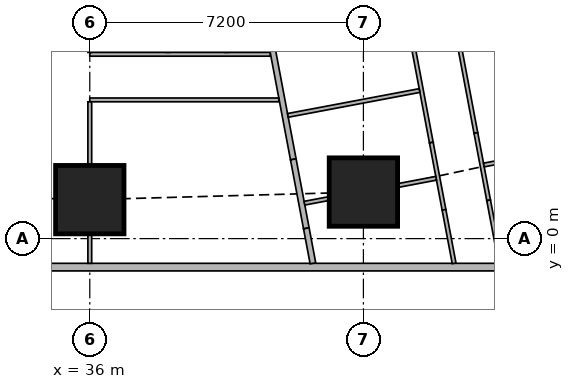
"""IFC4 building model, lengths in metres.
Left out: names, types, materials, properties, quantities, classifications, styles, units other than length and angle.
Written with IfcOpenShell. Run it as: python <this file> out.ifc"""

import sys

from ifc_helpers import new_model, si_unit, direction, frame, frame_2d, origin, origin_2d, place, context, subcontext, project, spatial, rectangle, extrude, element, fill, save


model = new_model("IFC4")
c1 = context("Model", 3, precision=1e-05, world=origin(), true_north=direction((0.0, 1.0)))
c2 = subcontext(c1, "Body", "Model", "MODEL_VIEW")
j1 = project(units=[si_unit("LENGTHUNIT", "METRE"), si_unit("PLANEANGLEUNIT", "RADIAN")], contexts=[c1])
p1 = place(None, origin())
s1 = spatial("IfcSite", under=j1, at=p1, CompositionType="ELEMENT")
p2 = place(p1, origin())
s2 = spatial("IfcBuilding", under=s1, at=p2, CompositionType="ELEMENT")
p3 = place(p2, frame((0.0, 0.0, 158.3)))
s3 = spatial("IfcBuildingStorey", under=s2, at=p3, CompositionType="ELEMENT", Elevation=158.3)
for number, where, z_axis, x_axis in (
    (1, (36.0, 1.025, 0.0), (0.0, 0.0, 1.0), (1.0, 0.0, 0.0)),
    (2, (43.2, 1.225, 0.0), (0.0, 0.0, 1.0), (1.0, 0.0, 0.0)),
):
    element("IfcColumn", number, at=place(p3, frame(where, z_axis=z_axis, x_axis=x_axis)), inside=s3, PredefinedType="COLUMN", context=c2, shape_type="SweptSolid", body=[
        extrude(rectangle(XDim=1.8, YDim=1.8, at=origin_2d()), origin(), (0.0, 0.0, 1.0), 3.75),
    ])
p4 = place(p3, frame((2.163, -0.75, 0.0), z_axis=(0.0, 0.0, 1.0), x_axis=(1.0, 0.0, 0.0)))
e3 = element("IfcWall", 3, at=p4, inside=s3, PredefinedType="SOLIDWALL", context=c2, shape_type="SweptSolid", body=[
    extrude(rectangle(XDim=45.628, YDim=0.2, at=frame_2d((22.814, 0.0))), origin(), (0.0, 0.0, 1.0), 3.5),
])
p5 = place(p4, frame((9.537, 0.0, 0.9)))
e4 = element("IfcOpeningElement", 4, at=p5, cuts=e3, PredefinedType="OPENING", context=c2, shape_type="SweptSolid", body=[
    extrude(rectangle(XDim=1.8, YDim=1.5, at=frame_2d((0.9, 0.75))), frame((0.0, 0.11, 0.0), z_axis=(0.0, -1.0, 0.0), x_axis=(1.0, 0.0, 0.0)), (0.0, 0.0, 1.0), 0.22),
])
p6 = place(p4, frame((13.137, 0.0, 0.9)))
e5 = element("IfcOpeningElement", 5, at=p6, cuts=e3, PredefinedType="OPENING", context=c2, shape_type="SweptSolid", body=[
    extrude(rectangle(XDim=1.8, YDim=1.5, at=frame_2d((0.9, 0.75))), frame((0.0, 0.11, 0.0), z_axis=(0.0, -1.0, 0.0), x_axis=(1.0, 0.0, 0.0)), (0.0, 0.0, 1.0), 0.22),
])
p7 = place(p4, frame((16.737, 0.0, 0.9)))
e6 = element("IfcOpeningElement", 6, at=p7, cuts=e3, PredefinedType="OPENING", context=c2, shape_type="SweptSolid", body=[
    extrude(rectangle(XDim=1.8, YDim=1.5, at=frame_2d((0.9, 0.75))), frame((0.0, 0.11, 0.0), z_axis=(0.0, -1.0, 0.0), x_axis=(1.0, 0.0, 0.0)), (0.0, 0.0, 1.0), 0.22),
])
p8 = place(p4, frame((20.337, 0.0, 0.9)))
e7 = element("IfcOpeningElement", 7, at=p8, cuts=e3, PredefinedType="OPENING", context=c2, shape_type="SweptSolid", body=[
    extrude(rectangle(XDim=1.8, YDim=1.5, at=frame_2d((0.9, 0.75))), frame((0.0, 0.11, 0.0), z_axis=(0.0, -1.0, 0.0), x_axis=(1.0, 0.0, 0.0)), (0.0, 0.0, 1.0), 0.22),
])
p9 = place(p4, frame((23.937, 0.0, 0.9)))
e8 = element("IfcOpeningElement", 8, at=p9, cuts=e3, PredefinedType="OPENING", context=c2, shape_type="SweptSolid", body=[
    extrude(rectangle(XDim=1.8, YDim=1.5, at=frame_2d((0.9, 0.75))), frame((0.0, 0.11, 0.0), z_axis=(0.0, -1.0, 0.0), x_axis=(1.0, 0.0, 0.0)), (0.0, 0.0, 1.0), 0.22),
])
p10 = place(p4, frame((27.537, 0.0, 0.9)))
e9 = element("IfcOpeningElement", 9, at=p10, cuts=e3, PredefinedType="OPENING", context=c2, shape_type="SweptSolid", body=[
    extrude(rectangle(XDim=1.8, YDim=1.5, at=frame_2d((0.9, 0.75))), frame((0.0, 0.11, 0.0), z_axis=(0.0, -1.0, 0.0), x_axis=(1.0, 0.0, 0.0)), (0.0, 0.0, 1.0), 0.22),
])
p11 = place(p4, frame((31.137, 0.0, 0.9)))
e10 = element("IfcOpeningElement", 10, at=p11, cuts=e3, PredefinedType="OPENING", context=c2, shape_type="SweptSolid", body=[
    extrude(rectangle(XDim=1.8, YDim=1.5, at=frame_2d((0.9, 0.75))), frame((0.0, 0.11, 0.0), z_axis=(0.0, -1.0, 0.0), x_axis=(1.0, 0.0, 0.0)), (0.0, 0.0, 1.0), 0.22),
])
p12 = place(p4, frame((34.737, 0.0, 0.9)))
e11 = element("IfcOpeningElement", 11, at=p12, cuts=e3, PredefinedType="OPENING", context=c2, shape_type="SweptSolid", body=[
    extrude(rectangle(XDim=1.8, YDim=1.5, at=frame_2d((0.9, 0.75))), frame((0.0, 0.11, 0.0), z_axis=(0.0, -1.0, 0.0), x_axis=(1.0, 0.0, 0.0)), (0.0, 0.0, 1.0), 0.22),
])
p13 = place(p3, frame((50.653, 2.703, 0.0), z_axis=(0.0, 0.0, 1.0), x_axis=(-0.185612026696, 0.982623109613, 0.0)))
e12 = element("IfcWall", 12, at=p13, inside=s3, PredefinedType="SOLIDWALL", context=c2, shape_type="SweptSolid", body=[
    extrude(rectangle(XDim=41.393, YDim=0.2, at=frame_2d((20.697, 0.0))), origin(), (0.0, 0.0, 1.0), 3.5),
])
p14 = place(p13, frame((1.633, 0.0, 0.9)))
e13 = element("IfcOpeningElement", 13, at=p14, cuts=e12, PredefinedType="OPENING", context=c2, shape_type="SweptSolid", body=[
    extrude(rectangle(XDim=1.8, YDim=1.5, at=frame_2d((0.9, 0.75))), frame((0.0, 0.11, 0.0), z_axis=(0.0, -1.0, 0.0), x_axis=(1.0, 0.0, 0.0)), (0.0, 0.0, 1.0), 0.22),
])
p15 = place(p13, frame((6.032, 0.0, 0.9)))
e14 = element("IfcOpeningElement", 14, at=p15, cuts=e12, PredefinedType="OPENING", context=c2, shape_type="SweptSolid", body=[
    extrude(rectangle(XDim=1.8, YDim=1.5, at=frame_2d((0.9, 0.75))), frame((0.0, 0.11, 0.0), z_axis=(0.0, -1.0, 0.0), x_axis=(1.0, 0.0, 0.0)), (0.0, 0.0, 1.0), 0.22),
])
p16 = place(p13, frame((9.848, 0.0, 0.9)))
e15 = element("IfcOpeningElement", 15, at=p16, cuts=e12, PredefinedType="OPENING", context=c2, shape_type="SweptSolid", body=[
    extrude(rectangle(XDim=1.8, YDim=1.5, at=frame_2d((0.9, 0.75))), frame((0.0, 0.11, 0.0), z_axis=(0.0, -1.0, 0.0), x_axis=(1.0, 0.0, 0.0)), (0.0, 0.0, 1.0), 0.22),
])
p17 = place(p13, frame((13.664, 0.0, 0.9)))
e16 = element("IfcOpeningElement", 16, at=p17, cuts=e12, PredefinedType="OPENING", context=c2, shape_type="SweptSolid", body=[
    extrude(rectangle(XDim=1.8, YDim=1.5, at=frame_2d((0.9, 0.75))), frame((0.0, 0.11, 0.0), z_axis=(0.0, -1.0, 0.0), x_axis=(1.0, 0.0, 0.0)), (0.0, 0.0, 1.0), 0.22),
])
p18 = place(p13, frame((17.481, 0.0, 0.9)))
e17 = element("IfcOpeningElement", 17, at=p18, cuts=e12, PredefinedType="OPENING", context=c2, shape_type="SweptSolid", body=[
    extrude(rectangle(XDim=1.8, YDim=1.5, at=frame_2d((0.9, 0.75))), frame((0.0, 0.11, 0.0), z_axis=(0.0, -1.0, 0.0), x_axis=(1.0, 0.0, 0.0)), (0.0, 0.0, 1.0), 0.22),
])
p19 = place(p13, frame((21.297, 0.0, 0.9)))
e18 = element("IfcOpeningElement", 18, at=p19, cuts=e12, PredefinedType="OPENING", context=c2, shape_type="SweptSolid", body=[
    extrude(rectangle(XDim=1.8, YDim=1.5, at=frame_2d((0.9, 0.75))), frame((0.0, 0.11, 0.0), z_axis=(0.0, -1.0, 0.0), x_axis=(1.0, 0.0, 0.0)), (0.0, 0.0, 1.0), 0.22),
])
p20 = place(p13, frame((25.113, 0.0, 0.9)))
e19 = element("IfcOpeningElement", 19, at=p20, cuts=e12, PredefinedType="OPENING", context=c2, shape_type="SweptSolid", body=[
    extrude(rectangle(XDim=1.8, YDim=1.5, at=frame_2d((0.9, 0.75))), frame((0.0, 0.11, 0.0), z_axis=(0.0, -1.0, 0.0), x_axis=(1.0, 0.0, 0.0)), (0.0, 0.0, 1.0), 0.22),
])
p21 = place(p13, frame((28.93, 0.0, 0.9)))
e20 = element("IfcOpeningElement", 20, at=p21, cuts=e12, PredefinedType="OPENING", context=c2, shape_type="SweptSolid", body=[
    extrude(rectangle(XDim=1.8, YDim=1.5, at=frame_2d((0.9, 0.75))), frame((0.0, 0.11, 0.0), z_axis=(0.0, -1.0, 0.0), x_axis=(1.0, 0.0, 0.0)), (0.0, 0.0, 1.0), 0.22),
])
p22 = place(p13, frame((32.746, 0.0, 0.9)))
e21 = element("IfcOpeningElement", 21, at=p22, cuts=e12, PredefinedType="OPENING", context=c2, shape_type="SweptSolid", body=[
    extrude(rectangle(XDim=1.8, YDim=1.5, at=frame_2d((0.9, 0.75))), frame((0.0, 0.11, 0.0), z_axis=(0.0, -1.0, 0.0), x_axis=(1.0, 0.0, 0.0)), (0.0, 0.0, 1.0), 0.22),
])
p23 = place(p13, frame((36.481, 0.0, 0.9)))
e22 = element("IfcOpeningElement", 22, at=p23, cuts=e12, PredefinedType="OPENING", context=c2, shape_type="SweptSolid", body=[
    extrude(rectangle(XDim=1.8, YDim=1.5, at=frame_2d((0.9, 0.75))), frame((0.0, 0.11, 0.0), z_axis=(0.0, -1.0, 0.0), x_axis=(1.0, 0.0, 0.0)), (0.0, 0.0, 1.0), 0.22),
])
p24 = place(p3, frame((33.623, 43.022, 0.0), z_axis=(0.0, 0.0, 1.0), x_axis=(0.185596841028, -0.98262597798, 0.0)))
e23 = element("IfcWall", 23, at=p24, inside=s3, PredefinedType="SOLIDWALL", context=c2, shape_type="SweptSolid", body=[
    extrude(rectangle(XDim=41.66, YDim=0.15, at=frame_2d((20.83, 0.0))), origin(), (0.0, 0.0, 1.0), 2.5),
])
p25 = place(p24, frame((21.514, 0.0, 0.0)))
e24 = element("IfcOpeningElement", 24, at=p25, cuts=e23, PredefinedType="OPENING", context=c2, shape_type="SweptSolid", body=[
    extrude(rectangle(XDim=1.0, YDim=2.1, at=frame_2d((0.5, 1.05))), frame((0.0, 0.085, 0.0), z_axis=(0.0, -1.0, 0.0), x_axis=(1.0, 0.0, 0.0)), (0.0, 0.0, 1.0), 0.17),
])
p26 = place(p24, frame((27.062, 0.0, 0.0)))
e25 = element("IfcOpeningElement", 25, at=p26, cuts=e23, PredefinedType="OPENING", context=c2, shape_type="SweptSolid", body=[
    extrude(rectangle(XDim=1.0, YDim=2.1, at=frame_2d((0.5, 1.05))), frame((0.0, 0.085, 0.0), z_axis=(0.0, -1.0, 0.0), x_axis=(1.0, 0.0, 0.0)), (0.0, 0.0, 1.0), 0.17),
])
p27 = place(p24, frame((29.934, 0.0, 0.0)))
e26 = element("IfcOpeningElement", 26, at=p27, cuts=e23, PredefinedType="OPENING", context=c2, shape_type="SweptSolid", body=[
    extrude(rectangle(XDim=1.0, YDim=2.1, at=frame_2d((0.5, 1.05))), frame((0.0, 0.085, 0.0), z_axis=(0.0, -1.0, 0.0), x_axis=(1.0, 0.0, 0.0)), (0.0, 0.0, 1.0), 0.17),
])
p28 = place(p3, frame((41.355, 2.086, 0.0), z_axis=(0.0, 0.0, 1.0), x_axis=(0.185708872674, -0.982604811005, 0.0)))
e27 = element("IfcWall", 27, at=p28, inside=s3, PredefinedType="SOLIDWALL", context=c2, shape_type="SweptSolid", body=[
    extrude(rectangle(XDim=1.847, YDim=0.15, at=frame_2d((0.924, 0.0))), origin(), (0.0, 0.0, 1.0), 2.1),
])
p29 = place(p3, frame((41.698, 0.271, 0.0), z_axis=(0.0, 0.0, 1.0), x_axis=(0.185735329995, -0.982599810295, 0.0)))
e28 = element("IfcWall", 28, at=p29, inside=s3, PredefinedType="SOLIDWALL", context=c2, shape_type="SweptSolid", body=[
    extrude(rectangle(XDim=0.937, YDim=0.15, at=frame_2d((0.469, 0.0))), origin(), (0.0, 0.0, 1.0), 3.5),
])
p30 = place(p3, frame((40.974, 3.65, 0.0), z_axis=(0.0, 0.0, 1.0), x_axis=(-1.0, 0.0, 0.0)))
e29 = element("IfcWall", 29, at=p30, inside=s3, PredefinedType="PARTITIONING", context=c2, shape_type="SweptSolid", body=[
    extrude(rectangle(XDim=4.974, YDim=0.1, at=frame_2d((2.487, 0.0))), origin(), (0.0, 0.0, 1.0), 3.5),
])
p31 = place(p30, frame((3.874, 0.0, 0.0)))
e30 = element("IfcOpeningElement", 30, at=p31, cuts=e29, PredefinedType="OPENING", context=c2, shape_type="SweptSolid", body=[
    extrude(rectangle(XDim=0.9, YDim=2.1, at=frame_2d((0.45, 1.05))), frame((0.0, 0.06, 0.0), z_axis=(0.0, -1.0, 0.0), x_axis=(1.0, 0.0, 0.0)), (0.0, 0.0, 1.0), 0.12),
])
p32 = place(p3, frame((40.747, 4.85, 0.0), z_axis=(0.0, 0.0, 1.0), x_axis=(-1.0, 0.0, 0.0)))
e31 = element("IfcWall", 31, at=p32, inside=s3, PredefinedType="PARTITIONING", context=c2, shape_type="SweptSolid", body=[
    extrude(rectangle(XDim=4.747, YDim=0.1, at=frame_2d((2.374, 0.0))), origin(), (0.0, 0.0, 1.0), 3.5),
])
p33 = place(p32, frame((3.272, 0.0, 0.0)))
e32 = element("IfcOpeningElement", 32, at=p33, cuts=e31, PredefinedType="OPENING", context=c2, shape_type="SweptSolid", body=[
    extrude(rectangle(XDim=0.9, YDim=2.1, at=frame_2d((0.45, 1.05))), frame((0.0, 0.06, 0.0), z_axis=(0.0, -1.0, 0.0), x_axis=(1.0, 0.0, 0.0)), (0.0, 0.0, 1.0), 0.12),
])
p34 = place(p32, frame((0.15, 0.0, 0.0)))
e33 = element("IfcOpeningElement", 33, at=p34, cuts=e31, PredefinedType="OPENING", context=c2, shape_type="SweptSolid", body=[
    extrude(rectangle(XDim=0.9, YDim=2.1, at=frame_2d((0.45, 1.05))), frame((0.0, 0.06, 0.0), z_axis=(0.0, -1.0, 0.0), x_axis=(1.0, 0.0, 0.0)), (0.0, 0.0, 1.0), 0.12),
])
p35 = place(p32, frame((1.472, 0.0, 0.0)))
e34 = element("IfcOpeningElement", 34, at=p35, cuts=e31, PredefinedType="OPENING", context=c2, shape_type="SweptSolid", body=[
    extrude(rectangle(XDim=0.9, YDim=2.1, at=frame_2d((0.45, 1.05))), frame((0.0, 0.06, 0.0), z_axis=(0.0, -1.0, 0.0), x_axis=(1.0, 0.0, 0.0)), (0.0, 0.0, 1.0), 0.12),
])
p36 = place(p3, frame((36.0, -0.65, 0.0), z_axis=(0.0, 0.0, 1.0), x_axis=(0.0, 1.0, 0.0)))
e35 = element("IfcWall", 35, at=p36, inside=s3, PredefinedType="PARTITIONING", context=c2, shape_type="SweptSolid", body=[
    extrude(rectangle(XDim=0.774, YDim=0.1, at=frame_2d((0.387, 0.0))), origin(), (0.0, 0.0, 1.0), 3.5),
])
p37 = place(p3, frame((36.0, 1.926, 0.0), z_axis=(0.0, 0.0, 1.0), x_axis=(0.0, 1.0, 0.0)))
e36 = element("IfcWall", 36, at=p37, inside=s3, PredefinedType="PARTITIONING", context=c2, shape_type="SweptSolid", body=[
    extrude(rectangle(XDim=1.674, YDim=0.1, at=frame_2d((0.837, 0.0))), origin(), (0.0, 0.0, 1.0), 3.5),
])
p38 = place(p3, frame((36.0, 4.9, 0.0), z_axis=(0.0, 0.0, 1.0), x_axis=(0.0, 1.0, 0.0)))
e37 = element("IfcWall", 37, at=p38, inside=s3, PredefinedType="PARTITIONING", context=c2, shape_type="SweptSolid", body=[
    extrude(rectangle(XDim=1.849, YDim=0.1, at=frame_2d((0.925, 0.0))), origin(), (0.0, 0.0, 1.0), 3.5),
])
for number, where, z_axis, x_axis in (
    (38, (39.6, 4.9, 0.0), (0.0, 0.0, 1.0), (0.0, 1.0, 0.0)),
    (39, (38.05, 4.9, 0.0), (0.0, 0.0, 1.0), (0.0, 1.0, 0.0)),
):
    element("IfcWall", number, at=place(p3, frame(where, z_axis=z_axis, x_axis=x_axis)), inside=s3, PredefinedType="PARTITIONING", context=c2, shape_type="SweptSolid", body=[
        extrude(rectangle(XDim=3.525, YDim=0.1, at=frame_2d((1.763, 0.0))), origin(), (0.0, 0.0, 1.0), 3.5),
    ])
p39 = place(p3, frame((43.992, 14.259, 0.0), z_axis=(0.0, 0.0, 1.0), x_axis=(0.185567765044, -0.98263146936, 0.0)))
e40 = element("IfcWall", 40, at=p39, inside=s3, PredefinedType="PARTITIONING", context=c2, shape_type="SweptSolid", body=[
    extrude(rectangle(XDim=11.683, YDim=0.1, at=frame_2d((5.841, 0.0))), origin(), (0.0, 0.0, 1.0), 3.5),
])
p40 = place(p39, frame((1.567, 0.0, 0.0)))
e41 = element("IfcOpeningElement", 41, at=p40, cuts=e40, PredefinedType="OPENING", context=c2, shape_type="SweptSolid", body=[
    extrude(rectangle(XDim=0.9, YDim=2.1, at=frame_2d((0.45, 1.05))), frame((0.0, 0.06, 0.0), z_axis=(0.0, -1.0, 0.0), x_axis=(1.0, 0.0, 0.0)), (0.0, 0.0, 1.0), 0.12),
])
p41 = place(p39, frame((4.112, 0.0, 0.0)))
e42 = element("IfcOpeningElement", 42, at=p41, cuts=e40, PredefinedType="OPENING", context=c2, shape_type="SweptSolid", body=[
    extrude(rectangle(XDim=0.9, YDim=2.1, at=frame_2d((0.45, 1.05))), frame((0.0, 0.06, 0.0), z_axis=(0.0, -1.0, 0.0), x_axis=(1.0, 0.0, 0.0)), (0.0, 0.0, 1.0), 0.12),
])
p42 = place(p39, frame((7.768, 0.0, 0.0)))
e43 = element("IfcOpeningElement", 43, at=p42, cuts=e40, PredefinedType="OPENING", context=c2, shape_type="SweptSolid", body=[
    extrude(rectangle(XDim=0.9, YDim=2.1, at=frame_2d((0.45, 1.05))), frame((0.0, 0.06, 0.0), z_axis=(0.0, -1.0, 0.0), x_axis=(1.0, 0.0, 0.0)), (0.0, 0.0, 1.0), 0.12),
])
p43 = place(p3, frame((46.16, 2.779, 0.0), z_axis=(0.0, 0.0, 1.0), x_axis=(0.18597295662, -0.982554863306, 0.0)))
e44 = element("IfcWall", 44, at=p43, inside=s3, PredefinedType="PARTITIONING", context=c2, shape_type="SweptSolid", body=[
    extrude(rectangle(XDim=1.802, YDim=0.1, at=frame_2d((0.901, 0.0))), origin(), (0.0, 0.0, 1.0), 2.1),
])
p44 = place(p3, frame((46.495, 1.008, 0.0), z_axis=(0.0, 0.0, 1.0), x_axis=(0.185502765063, -0.982643742235, 0.0)))
e45 = element("IfcWall", 45, at=p44, inside=s3, PredefinedType="PARTITIONING", context=c2, shape_type="SweptSolid", body=[
    extrude(rectangle(XDim=1.687, YDim=0.1, at=frame_2d((0.844, 0.0))), origin(), (0.0, 0.0, 1.0), 3.5),
])
p45 = place(p3, frame((43.999, 7.756, 0.0), z_axis=(0.0, 0.0, 1.0), x_axis=(0.185701292061, -0.982606243684, 0.0)))
e46 = element("IfcWall", 46, at=p45, inside=s3, PredefinedType="PARTITIONING", context=c2, shape_type="SweptSolid", body=[
    extrude(rectangle(XDim=5.321, YDim=0.1, at=frame_2d((2.66, 0.0))), origin(), (0.0, 0.0, 1.0), 3.5),
])
p46 = place(p45, frame((1.0, 0.0, 0.0)))
e47 = element("IfcOpeningElement", 47, at=p46, cuts=e46, PredefinedType="OPENING", context=c2, shape_type="SweptSolid", body=[
    extrude(rectangle(XDim=0.9, YDim=2.1, at=frame_2d((0.45, 1.05))), frame((0.0, 0.06, 0.0), z_axis=(0.0, -1.0, 0.0), x_axis=(1.0, 0.0, 0.0)), (0.0, 0.0, 1.0), 0.12),
])
p47 = place(p45, frame((4.271, 0.0, 0.0)))
e48 = element("IfcOpeningElement", 48, at=p47, cuts=e46, PredefinedType="OPENING", context=c2, shape_type="SweptSolid", body=[
    extrude(rectangle(XDim=0.9, YDim=2.1, at=frame_2d((0.45, 1.05))), frame((0.0, 0.06, 0.0), z_axis=(0.0, -1.0, 0.0), x_axis=(1.0, 0.0, 0.0)), (0.0, 0.0, 1.0), 0.12),
])
p48 = place(p45, frame((2.586, 0.0, 0.0)))
e49 = element("IfcOpeningElement", 49, at=p48, cuts=e46, PredefinedType="OPENING", context=c2, shape_type="SweptSolid", body=[
    extrude(rectangle(XDim=0.9, YDim=2.1, at=frame_2d((0.45, 1.05))), frame((0.0, 0.06, 0.0), z_axis=(0.0, -1.0, 0.0), x_axis=(1.0, 0.0, 0.0)), (0.0, 0.0, 1.0), 0.12),
])
p49 = place(p3, frame((44.987, 2.528, 0.0), z_axis=(0.0, 0.0, 1.0), x_axis=(0.185319006173, -0.98267841431, 0.0)))
e50 = element("IfcWall", 50, at=p49, inside=s3, PredefinedType="PARTITIONING", context=c2, shape_type="SweptSolid", body=[
    extrude(rectangle(XDim=1.802, YDim=0.1, at=frame_2d((0.901, 0.0))), origin(), (0.0, 0.0, 1.0), 2.1),
])
p50 = place(p3, frame((45.321, 0.757, 0.0), z_axis=(0.0, 0.0, 1.0), x_axis=(0.185678113719, -0.982610623841, 0.0)))
e51 = element("IfcWall", 51, at=p50, inside=s3, PredefinedType="PARTITIONING", context=c2, shape_type="SweptSolid", body=[
    extrude(rectangle(XDim=1.432, YDim=0.1, at=frame_2d((0.716, 0.0))), origin(), (0.0, 0.0, 1.0), 3.5),
])
p51 = place(p50, frame((0.15, 0.0, 0.0)))
e52 = element("IfcOpeningElement", 52, at=p51, cuts=e51, PredefinedType="OPENING", context=c2, shape_type="SweptSolid", body=[
    extrude(rectangle(XDim=0.9, YDim=2.1, at=frame_2d((0.45, 1.05))), frame((0.0, 0.06, 0.0), z_axis=(0.0, -1.0, 0.0), x_axis=(1.0, 0.0, 0.0)), (0.0, 0.0, 1.0), 0.12),
])
p52 = place(p3, frame((46.738, 2.006, 0.0), z_axis=(0.0, 0.0, 1.0), x_axis=(-0.982820466874, -0.184564161994, 0.0)))
e53 = element("IfcWall", 53, at=p52, inside=s3, PredefinedType="PARTITIONING", context=c2, shape_type="SweptSolid", body=[
    extrude(rectangle(XDim=0.374, YDim=0.1, at=frame_2d((0.187, 0.0))), origin(), (0.0, 0.0, 1.0), 2.1),
])
p53 = place(p3, frame((45.114, 1.587, 0.0), z_axis=(0.0, 0.0, 1.0), x_axis=(-0.982567886437, -0.185904138047, 0.0)))
e54 = element("IfcWall", 54, at=p53, inside=s3, PredefinedType="PARTITIONING", context=c2, shape_type="SweptSolid", body=[
    extrude(rectangle(XDim=1.022, YDim=0.1, at=frame_2d((0.511, 0.0))), origin(), (0.0, 0.0, 1.0), 2.1),
])
p54 = place(p3, frame((42.29, 1.053, 0.0), z_axis=(0.0, 0.0, 1.0), x_axis=(-0.982573945355, -0.185872111707, 0.0)))
e55 = element("IfcWall", 55, at=p54, inside=s3, PredefinedType="PARTITIONING", context=c2, shape_type="SweptSolid", body=[
    extrude(rectangle(XDim=0.652, YDim=0.1, at=frame_2d((0.326, 0.0))), origin(), (0.0, 0.0, 1.0), 2.1),
])
p55 = place(p3, frame((44.677, 3.896, 0.0), z_axis=(0.0, 0.0, 1.0), x_axis=(-0.982638553676, -0.185530247748, 0.0)))
e56 = element("IfcWall", 56, at=p55, inside=s3, PredefinedType="PARTITIONING", context=c2, shape_type="SweptSolid", body=[
    extrude(rectangle(XDim=3.525, YDim=0.1, at=frame_2d((1.763, 0.0))), origin(), (0.0, 0.0, 1.0), 3.5),
])
p56 = place(p11, origin())
e57 = element("IfcWindow", 57, at=p56, inside=s3, PartitioningType="SINGLE_PANEL", PredefinedType="WINDOW", context=c2, shape_type="SweptSolid", body=[
    extrude(rectangle(XDim=1.8, YDim=1.5, at=frame_2d((0.9, 0.75))), frame((0.0, 0.03, 0.0), z_axis=(0.0, -1.0, 0.0), x_axis=(1.0, 0.0, 0.0)), (0.0, 0.0, 1.0), 0.06),
])
fill(e10, e57)
p57 = place(p12, origin())
e58 = element("IfcWindow", 58, at=p57, inside=s3, PartitioningType="SINGLE_PANEL", PredefinedType="WINDOW", context=c2, shape_type="SweptSolid", body=[
    extrude(rectangle(XDim=1.8, YDim=1.5, at=frame_2d((0.9, 0.75))), frame((0.0, 0.03, 0.0), z_axis=(0.0, -1.0, 0.0), x_axis=(1.0, 0.0, 0.0)), (0.0, 0.0, 1.0), 0.06),
])
fill(e11, e58)
p58 = place(p31, origin())
e59 = element("IfcDoor", 59, at=p58, inside=s3, OperationType="SINGLE_SWING_RIGHT", PredefinedType="DOOR", context=c2, shape_type="SweptSolid", body=[
    extrude(rectangle(XDim=0.9, YDim=2.1, at=frame_2d((0.45, 1.05))), frame((0.0, 0.025, 0.0), z_axis=(0.0, -1.0, 0.0), x_axis=(1.0, 0.0, 0.0)), (0.0, 0.0, 1.0), 0.05),
])
fill(e30, e59)
p59 = place(p33, origin())
e60 = element("IfcDoor", 60, at=p59, inside=s3, OperationType="SINGLE_SWING_LEFT", PredefinedType="DOOR", context=c2, shape_type="SweptSolid", body=[
    extrude(rectangle(XDim=0.9, YDim=2.1, at=frame_2d((0.45, 1.05))), frame((0.0, 0.025, 0.0), z_axis=(0.0, -1.0, 0.0), x_axis=(1.0, 0.0, 0.0)), (0.0, 0.0, 1.0), 0.05),
])
fill(e32, e60)
p60 = place(p34, origin())
e61 = element("IfcDoor", 61, at=p60, inside=s3, OperationType="SINGLE_SWING_RIGHT", PredefinedType="DOOR", context=c2, shape_type="SweptSolid", body=[
    extrude(rectangle(XDim=0.9, YDim=2.1, at=frame_2d((0.45, 1.05))), frame((0.0, 0.025, 0.0), z_axis=(0.0, -1.0, 0.0), x_axis=(1.0, 0.0, 0.0)), (0.0, 0.0, 1.0), 0.05),
])
fill(e33, e61)
p61 = place(p35, origin())
e62 = element("IfcDoor", 62, at=p61, inside=s3, OperationType="SINGLE_SWING_RIGHT", PredefinedType="DOOR", context=c2, shape_type="SweptSolid", body=[
    extrude(rectangle(XDim=0.9, YDim=2.1, at=frame_2d((0.45, 1.05))), frame((0.0, 0.025, 0.0), z_axis=(0.0, -1.0, 0.0), x_axis=(1.0, 0.0, 0.0)), (0.0, 0.0, 1.0), 0.05),
])
fill(e34, e62)
p62 = place(p47, origin())
e63 = element("IfcDoor", 63, at=p62, inside=s3, OperationType="SINGLE_SWING_LEFT", PredefinedType="DOOR", context=c2, shape_type="SweptSolid", body=[
    extrude(rectangle(XDim=0.9, YDim=2.1, at=frame_2d((0.45, 1.05))), frame((0.0, 0.025, 0.0), z_axis=(0.0, -1.0, 0.0), x_axis=(1.0, 0.0, 0.0)), (0.0, 0.0, 1.0), 0.05),
])
fill(e48, e63)
p63 = place(p51, origin())
e64 = element("IfcDoor", 64, at=p63, inside=s3, OperationType="SINGLE_SWING_RIGHT", PredefinedType="DOOR", context=c2, shape_type="SweptSolid", body=[
    extrude(rectangle(XDim=0.9, YDim=2.1, at=frame_2d((0.45, 1.05))), frame((0.0, 0.025, 0.0), z_axis=(0.0, -1.0, 0.0), x_axis=(1.0, 0.0, 0.0)), (0.0, 0.0, 1.0), 0.05),
])
fill(e52, e64)
p64 = place(p48, origin())
e65 = element("IfcDoor", 65, at=p64, inside=s3, OperationType="SINGLE_SWING_LEFT", PredefinedType="DOOR", context=c2, shape_type="SweptSolid", body=[
    extrude(rectangle(XDim=0.9, YDim=2.1, at=frame_2d((0.45, 1.05))), frame((0.0, 0.025, 0.0), z_axis=(0.0, -1.0, 0.0), x_axis=(1.0, 0.0, 0.0)), (0.0, 0.0, 1.0), 0.05),
])
fill(e49, e65)
save(model, sys.argv[1])
